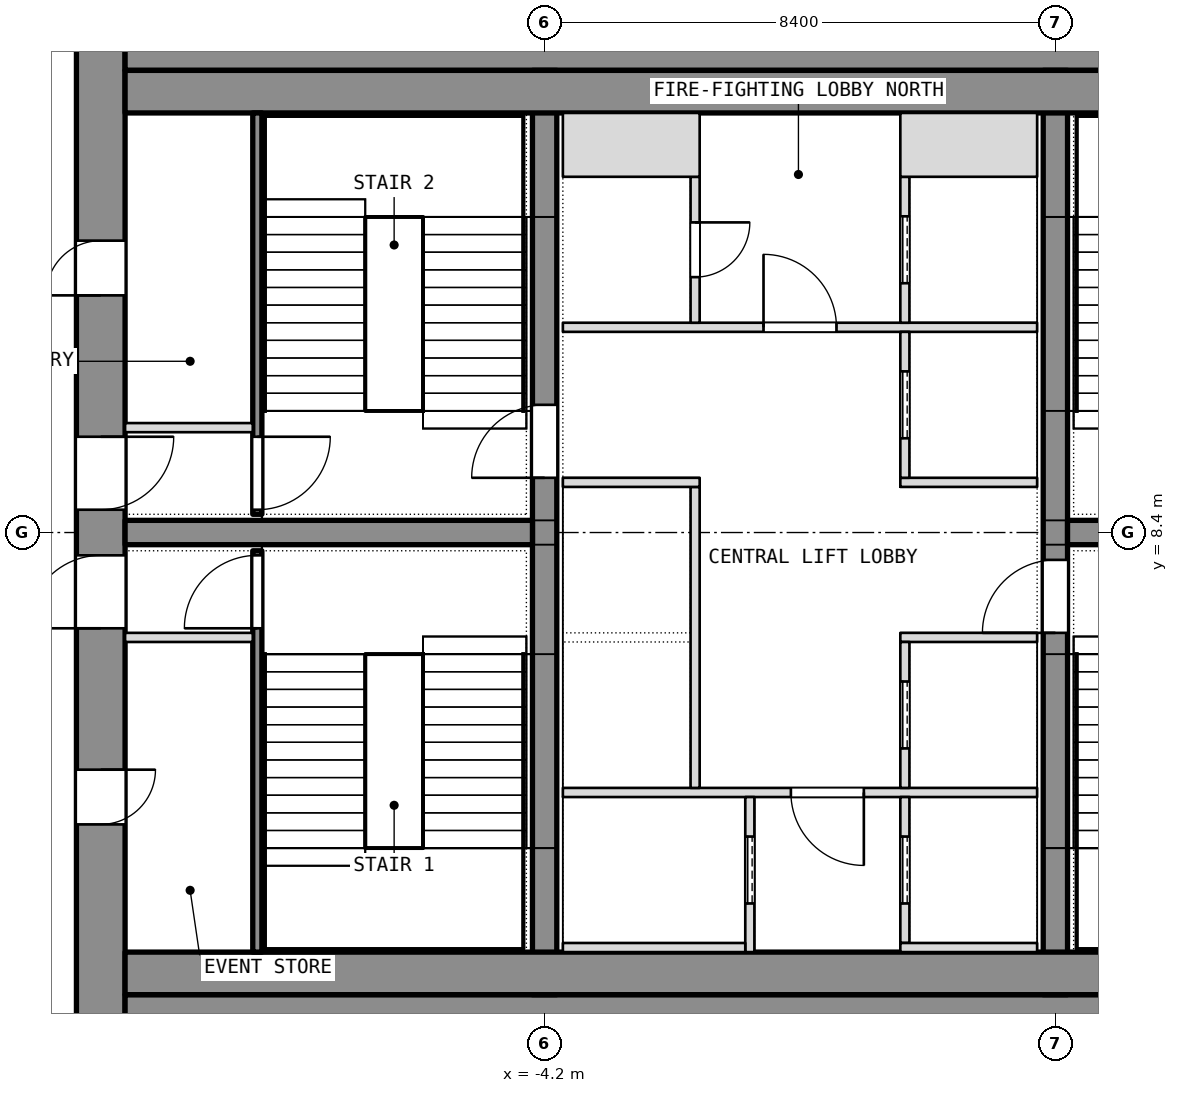
"""IFC4 building model, lengths in metres.
Left out: names, types, materials, properties, quantities, classifications, styles, units other than length and angle.
Written with IfcOpenShell. Run it as: python <this file> out.ifc"""

import sys

from ifc_helpers import new_model, si_unit, direction, frame, frame_2d, origin, place, context, subcontext, project, spatial, rectangle, extrude, element, fill, save


model = new_model("IFC4")
c1 = context("Model", 3, precision=1e-05, world=origin(), true_north=direction((0.0, 1.0)))
c2 = subcontext(c1, "Body", "Model", "MODEL_VIEW")
j1 = project(units=[si_unit("LENGTHUNIT", "METRE"), si_unit("PLANEANGLEUNIT", "RADIAN")], contexts=[c1])
p1 = place(None, origin())
s1 = spatial("IfcSite", under=j1, at=p1, CompositionType="ELEMENT")
p2 = place(p1, origin())
s2 = spatial("IfcBuilding", under=s1, at=p2, CompositionType="ELEMENT")
p3 = place(p2, frame((0.0, 0.0, 180.5)))
s3 = spatial("IfcBuildingStorey", under=s2, at=p3, CompositionType="ELEMENT", Elevation=180.5)
p4 = place(p3, frame((-11.5, 0.0, 0.0), z_axis=(0.0, 0.0, 1.0), x_axis=(0.0, 1.0, 0.0)))
e1 = element("IfcWall", 1, at=p4, inside=s3, PredefinedType="SHEAR", context=c2, shape_type="SweptSolid", body=[
    extrude(rectangle(XDim=16.8, YDim=0.8, at=frame_2d((8.4, 0.0))), origin(), (0.0, 0.0, 1.0), 7.2),
])
p5 = place(p4, frame((3.6, 0.0, 0.0)))
e2 = element("IfcOpeningElement", 2, at=p5, cuts=e1, PredefinedType="OPENING", context=c2, shape_type="SweptSolid", body=[
    extrude(rectangle(XDim=0.9, YDim=2.1, at=frame_2d((0.45, 1.05))), frame((0.0, 0.4, 0.0), z_axis=(0.0, -1.0, 0.0), x_axis=(1.0, 0.0, 0.0)), (0.0, 0.0, 1.0), 0.8),
])
p6 = place(p4, frame((6.825, 0.0, 0.0)))
e3 = element("IfcOpeningElement", 3, at=p6, cuts=e1, PredefinedType="OPENING", context=c2, shape_type="SweptSolid", body=[
    extrude(rectangle(XDim=1.2, YDim=2.1, at=frame_2d((0.6, 1.05))), frame((0.0, 0.4, 0.0), z_axis=(0.0, -1.0, 0.0), x_axis=(1.0, 0.0, 0.0)), (0.0, 0.0, 1.0), 0.8),
])
p7 = place(p4, frame((12.3, 0.0, 0.0)))
e4 = element("IfcOpeningElement", 4, at=p7, cuts=e1, PredefinedType="OPENING", context=c2, shape_type="SweptSolid", body=[
    extrude(rectangle(XDim=0.9, YDim=2.1, at=frame_2d((0.45, 1.05))), frame((0.0, 0.4, 0.0), z_axis=(0.0, -1.0, 0.0), x_axis=(1.0, 0.0, 0.0)), (0.0, 0.0, 1.0), 0.8),
])
p8 = place(p4, frame((8.775, 0.0, 0.0)))
e5 = element("IfcOpeningElement", 5, at=p8, cuts=e1, PredefinedType="OPENING", context=c2, shape_type="SweptSolid", body=[
    extrude(rectangle(XDim=1.2, YDim=2.1, at=frame_2d((0.6, 1.05))), frame((0.0, 0.4, 0.0), z_axis=(0.0, -1.0, 0.0), x_axis=(1.0, 0.0, 0.0)), (0.0, 0.0, 1.0), 0.8),
])
for number, where, z_axis, x_axis in (
    (6, (-11.1, 0.4, 0.0), (0.0, 0.0, 1.0), (1.0, 0.0, 0.0)),
    (7, (-11.1, 16.4, 0.0), (0.0, 0.0, 1.0), (1.0, 0.0, 0.0)),
):
    element("IfcWall", number, at=place(p3, frame(where, z_axis=z_axis, x_axis=x_axis)), inside=s3, PredefinedType="SHEAR", context=c2, shape_type="SweptSolid", body=[
        extrude(rectangle(XDim=22.2, YDim=0.8, at=frame_2d((11.1, 0.0))), origin(), (0.0, 0.0, 1.0), 7.2),
    ])
p9 = place(p3, frame((-4.2, 0.8, 0.0), z_axis=(0.0, 0.0, 1.0), x_axis=(0.0, 1.0, 0.0)))
e8 = element("IfcWall", 8, at=p9, inside=s3, PredefinedType="SHEAR", context=c2, shape_type="SweptSolid", body=[
    extrude(rectangle(XDim=15.2, YDim=0.4, at=frame_2d((7.6, 0.0))), origin(), (0.0, 0.0, 1.0), 7.2),
])
p10 = place(p9, frame((8.5, 0.0, 0.0)))
e9 = element("IfcOpeningElement", 9, at=p10, cuts=e8, PredefinedType="OPENING", context=c2, shape_type="SweptSolid", body=[
    extrude(rectangle(XDim=1.2, YDim=2.1, at=frame_2d((0.6, 1.05))), frame((0.0, 0.2, 0.0), z_axis=(0.0, -1.0, 0.0), x_axis=(1.0, 0.0, 0.0)), (0.0, 0.0, 1.0), 0.4),
])
p11 = place(p3, frame((4.2, 0.8, 0.0), z_axis=(0.0, 0.0, 1.0), x_axis=(0.0, 1.0, 0.0)))
e10 = element("IfcWall", 10, at=p11, inside=s3, PredefinedType="SHEAR", context=c2, shape_type="SweptSolid", body=[
    extrude(rectangle(XDim=15.2, YDim=0.4, at=frame_2d((7.6, 0.0))), origin(), (0.0, 0.0, 1.0), 7.2),
])
p12 = place(p11, frame((5.95, 0.0, 0.0)))
e11 = element("IfcOpeningElement", 11, at=p12, cuts=e10, PredefinedType="OPENING", context=c2, shape_type="SweptSolid", body=[
    extrude(rectangle(XDim=1.2, YDim=2.1, at=frame_2d((0.6, 1.05))), frame((0.0, 0.2, 0.0), z_axis=(0.0, -1.0, 0.0), x_axis=(1.0, 0.0, 0.0)), (0.0, 0.0, 1.0), 0.4),
])
for number, where, z_axis, x_axis in (
    (12, (-11.1, 8.4, 0.0), (0.0, 0.0, 1.0), (1.0, 0.0, 0.0)),
    (13, (4.4, 8.4, 0.0), (0.0, 0.0, 1.0), (1.0, 0.0, 0.0)),
):
    element("IfcWall", number, at=place(p3, frame(where, z_axis=z_axis, x_axis=x_axis)), inside=s3, PredefinedType="SHEAR", context=c2, shape_type="SweptSolid", body=[
        extrude(rectangle(XDim=6.7, YDim=0.4, at=frame_2d((3.35, 0.0))), origin(), (0.0, 0.0, 1.0), 7.2),
    ])
for number, where, z_axis, x_axis in (
    (14, (-11.1, 1.15, 0.0), (0.0, 0.0, 1.0), (1.0, 0.0, 0.0)),
    (15, (-11.1, 15.65, 0.0), (0.0, 0.0, 1.0), (1.0, 0.0, 0.0)),
):
    element("IfcWall", number, at=place(p3, frame(where, z_axis=z_axis, x_axis=x_axis)), inside=s3, PredefinedType="PARTITIONING", context=c2, shape_type="SweptSolid", body=[
        extrude(rectangle(XDim=22.2, YDim=0.7, at=frame_2d((11.1, 0.0))), origin(), (0.0, 0.0, 1.0), 6.94),
    ])
p13 = place(p3, frame((-8.925, 1.5, 0.0), z_axis=(0.0, 0.0, 1.0), x_axis=(0.0, 1.0, 0.0)))
e16 = element("IfcWall", 16, at=p13, inside=s3, PredefinedType="SHEAR", context=c2, shape_type="SweptSolid", body=[
    extrude(rectangle(XDim=6.6, YDim=0.15, at=frame_2d((3.3, 0.0))), origin(), (0.0, 0.0, 1.0), 6.94),
])
p14 = place(p13, frame((5.325, 0.0, 0.0)))
e17 = element("IfcOpeningElement", 17, at=p14, cuts=e16, PredefinedType="OPENING", context=c2, shape_type="SweptSolid", body=[
    extrude(rectangle(XDim=1.2, YDim=2.1, at=frame_2d((0.6, 1.05))), frame((0.0, 0.075, 0.0), z_axis=(0.0, -1.0, 0.0), x_axis=(1.0, 0.0, 0.0)), (0.0, 0.0, 1.0), 0.15),
])
p15 = place(p3, frame((-11.1, 6.675, 0.0), z_axis=(0.0, 0.0, 1.0), x_axis=(1.0, 0.0, 0.0)))
e18 = element("IfcWall", 18, at=p15, inside=s3, PredefinedType="PARTITIONING", context=c2, shape_type="SweptSolid", body=[
    extrude(rectangle(XDim=2.1, YDim=0.15, at=frame_2d((1.05, 0.0))), origin(), (0.0, 0.0, 1.0), 6.94),
])
p16 = place(p3, frame((-8.925, 8.7, 0.0), z_axis=(0.0, 0.0, 1.0), x_axis=(0.0, 1.0, 0.0)))
e19 = element("IfcWall", 19, at=p16, inside=s3, PredefinedType="SHEAR", context=c2, shape_type="SweptSolid", body=[
    extrude(rectangle(XDim=6.6, YDim=0.15, at=frame_2d((3.3, 0.0))), origin(), (0.0, 0.0, 1.0), 6.94),
])
p17 = place(p16, frame((0.075, 0.0, 0.0)))
e20 = element("IfcOpeningElement", 20, at=p17, cuts=e19, PredefinedType="OPENING", context=c2, shape_type="SweptSolid", body=[
    extrude(rectangle(XDim=1.2, YDim=2.1, at=frame_2d((0.6, 1.05))), frame((0.0, 0.075, 0.0), z_axis=(0.0, -1.0, 0.0), x_axis=(1.0, 0.0, 0.0)), (0.0, 0.0, 1.0), 0.15),
])
p18 = place(p3, frame((-11.1, 10.125, 0.0), z_axis=(0.0, 0.0, 1.0), x_axis=(1.0, 0.0, 0.0)))
e21 = element("IfcWall", 21, at=p18, inside=s3, PredefinedType="PARTITIONING", context=c2, shape_type="SweptSolid", body=[
    extrude(rectangle(XDim=2.1, YDim=0.15, at=frame_2d((1.05, 0.0))), origin(), (0.0, 0.0, 1.0), 6.94),
])
p19 = place(p3, frame((-3.9, 4.125, 0.0), z_axis=(0.0, 0.0, 1.0), x_axis=(1.0, 0.0, 0.0)))
e22 = element("IfcWall", 22, at=p19, inside=s3, PredefinedType="PARTITIONING", context=c2, shape_type="SweptSolid", body=[
    extrude(rectangle(XDim=7.8, YDim=0.15, at=frame_2d((3.9, 0.0))), origin(), (0.0, 0.0, 1.0), 6.94),
])
p20 = place(p19, frame((3.75, 0.0, 0.0)))
e23 = element("IfcOpeningElement", 23, at=p20, cuts=e22, PredefinedType="OPENING", context=c2, shape_type="SweptSolid", body=[
    extrude(rectangle(XDim=1.2, YDim=2.1, at=frame_2d((0.6, 1.05))), frame((0.0, 0.075, 0.0), z_axis=(0.0, -1.0, 0.0), x_axis=(1.0, 0.0, 0.0)), (0.0, 0.0, 1.0), 0.15),
])
p21 = place(p3, frame((-3.9, 11.775, 0.0), z_axis=(0.0, 0.0, 1.0), x_axis=(1.0, 0.0, 0.0)))
e24 = element("IfcWall", 24, at=p21, inside=s3, PredefinedType="PARTITIONING", context=c2, shape_type="SweptSolid", body=[
    extrude(rectangle(XDim=7.8, YDim=0.15, at=frame_2d((3.9, 0.0))), origin(), (0.0, 0.0, 1.0), 6.94),
])
p22 = place(p21, frame((3.3, 0.0, 0.0)))
e25 = element("IfcOpeningElement", 25, at=p22, cuts=e24, PredefinedType="OPENING", context=c2, shape_type="SweptSolid", body=[
    extrude(rectangle(XDim=1.2, YDim=2.1, at=frame_2d((0.6, 1.05))), frame((0.0, 0.075, 0.0), z_axis=(0.0, -1.0, 0.0), x_axis=(1.0, 0.0, 0.0)), (0.0, 0.0, 1.0), 0.15),
])
p23 = place(p3, frame((-0.825, 1.5, 0.0), z_axis=(0.0, 0.0, 1.0), x_axis=(0.0, 1.0, 0.0)))
e26 = element("IfcWall", 26, at=p23, inside=s3, PredefinedType="SHEAR", context=c2, shape_type="SweptSolid", body=[
    extrude(rectangle(XDim=2.55, YDim=0.15, at=frame_2d((1.275, 0.0))), origin(), (0.0, 0.0, 1.0), 7.2),
])
p24 = place(p23, frame((0.8, 0.0, 0.0)))
e27 = element("IfcOpeningElement", 27, at=p24, cuts=e26, PredefinedType="OPENING", context=c2, shape_type="SweptSolid", body=[
    extrude(rectangle(XDim=1.1, YDim=2.1, at=frame_2d((0.55, 1.05))), frame((0.0, 0.075, 0.0), z_axis=(0.0, -1.0, 0.0), x_axis=(1.0, 0.0, 0.0)), (0.0, 0.0, 1.0), 0.15),
])
p25 = place(p3, frame((-3.9, 1.575, 0.0), z_axis=(0.0, 0.0, 1.0), x_axis=(1.0, 0.0, 0.0)))
e28 = element("IfcWall", 28, at=p25, inside=s3, PredefinedType="SHEAR", context=c2, shape_type="SweptSolid", body=[
    extrude(rectangle(XDim=3.0, YDim=0.15, at=frame_2d((1.5, 0.0))), origin(), (0.0, 0.0, 1.0), 7.2),
])
p26 = place(p3, frame((-1.725, 4.2, 0.0), z_axis=(0.0, 0.0, 1.0), x_axis=(0.0, 1.0, 0.0)))
e29 = element("IfcWall", 29, at=p26, inside=s3, PredefinedType="SHEAR", context=c2, shape_type="SweptSolid", body=[
    extrude(rectangle(XDim=4.95, YDim=0.15, at=frame_2d((2.475, 0.0))), origin(), (0.0, 0.0, 1.0), 7.2),
])
p27 = place(p3, frame((-3.9, 9.225, 0.0), z_axis=(0.0, 0.0, 1.0), x_axis=(1.0, 0.0, 0.0)))
e30 = element("IfcWall", 30, at=p27, inside=s3, PredefinedType="SHEAR", context=c2, shape_type="SweptSolid", body=[
    extrude(rectangle(XDim=2.25, YDim=0.15, at=frame_2d((1.125, 0.0))), origin(), (0.0, 0.0, 1.0), 7.2),
])
p28 = place(p3, frame((-1.725, 11.85, 0.0), z_axis=(0.0, 0.0, 1.0), x_axis=(0.0, 1.0, 0.0)))
e31 = element("IfcWall", 31, at=p28, inside=s3, PredefinedType="PARTITIONING", context=c2, shape_type="SweptSolid", body=[
    extrude(rectangle(XDim=2.4, YDim=0.15, at=frame_2d((1.2, 0.0))), origin(), (0.0, 0.0, 1.0), 6.94),
])
p29 = place(p28, frame((0.75, 0.0, 0.0)))
e32 = element("IfcOpeningElement", 32, at=p29, cuts=e31, PredefinedType="OPENING", context=c2, shape_type="SweptSolid", body=[
    extrude(rectangle(XDim=0.9, YDim=2.1, at=frame_2d((0.45, 1.05))), frame((0.0, 0.075, 0.0), z_axis=(0.0, -1.0, 0.0), x_axis=(1.0, 0.0, 0.0)), (0.0, 0.0, 1.0), 0.15),
])
p30 = place(p3, frame((-3.9, 14.775, 0.0), z_axis=(0.0, 0.0, 1.0), x_axis=(1.0, 0.0, 0.0)))
e33 = element("IfcWall", 33, at=p30, inside=s3, PredefinedType="PARTITIONING", context=c2, shape_type="SweptSolid", body=[
    extrude(rectangle(XDim=2.25, YDim=1.05, at=frame_2d((1.125, 0.0))), origin(), (0.0, 0.0, 1.0), 6.94),
])
p31 = place(p3, frame((1.725, 1.65, 0.0), z_axis=(0.0, 0.0, 1.0), x_axis=(0.0, 1.0, 0.0)))
e34 = element("IfcWall", 34, at=p31, inside=s3, PredefinedType="SHEAR", context=c2, shape_type="SweptSolid", body=[
    extrude(rectangle(XDim=2.4, YDim=0.15, at=frame_2d((1.2, 0.0))), origin(), (0.0, 0.0, 1.0), 7.2),
])
p32 = place(p31, frame((0.65, 0.0, 0.0)))
e35 = element("IfcOpeningElement", 35, at=p32, cuts=e34, PredefinedType="OPENING", context=c2, shape_type="SweptSolid", body=[
    extrude(rectangle(XDim=1.1, YDim=2.1, at=frame_2d((0.55, 1.05))), frame((0.0, 0.075, 0.0), z_axis=(0.0, -1.0, 0.0), x_axis=(1.0, 0.0, 0.0)), (0.0, 0.0, 1.0), 0.15),
])
p33 = place(p3, frame((1.65, 1.575, 0.0), z_axis=(0.0, 0.0, 1.0), x_axis=(1.0, 0.0, 0.0)))
e36 = element("IfcWall", 36, at=p33, inside=s3, PredefinedType="SHEAR", context=c2, shape_type="SweptSolid", body=[
    extrude(rectangle(XDim=2.25, YDim=0.15, at=frame_2d((1.125, 0.0))), origin(), (0.0, 0.0, 1.0), 7.2),
])
p34 = place(p3, frame((1.725, 11.85, 0.0), z_axis=(0.0, 0.0, 1.0), x_axis=(0.0, 1.0, 0.0)))
e37 = element("IfcWall", 37, at=p34, inside=s3, PredefinedType="SHEAR", context=c2, shape_type="SweptSolid", body=[
    extrude(rectangle(XDim=2.4, YDim=0.15, at=frame_2d((1.2, 0.0))), origin(), (0.0, 0.0, 1.0), 7.2),
])
p35 = place(p34, frame((0.65, 0.0, 0.0)))
e38 = element("IfcOpeningElement", 38, at=p35, cuts=e37, PredefinedType="OPENING", context=c2, shape_type="SweptSolid", body=[
    extrude(rectangle(XDim=1.1, YDim=2.1, at=frame_2d((0.55, 1.05))), frame((0.0, 0.075, 0.0), z_axis=(0.0, -1.0, 0.0), x_axis=(1.0, 0.0, 0.0)), (0.0, 0.0, 1.0), 0.15),
])
p36 = place(p3, frame((1.65, 14.775, 0.0), z_axis=(0.0, 0.0, 1.0), x_axis=(1.0, 0.0, 0.0)))
e39 = element("IfcWall", 39, at=p36, inside=s3, PredefinedType="SHEAR", context=c2, shape_type="SweptSolid", body=[
    extrude(rectangle(XDim=2.25, YDim=1.05, at=frame_2d((1.125, 0.0))), origin(), (0.0, 0.0, 1.0), 7.2),
])
for number, where, z_axis, x_axis in (
    (40, (1.65, 6.675, 0.0), (0.0, 0.0, 1.0), (1.0, 0.0, 0.0)),
    (41, (1.65, 9.225, 0.0), (0.0, 0.0, 1.0), (1.0, 0.0, 0.0)),
):
    element("IfcWall", number, at=place(p3, frame(where, z_axis=z_axis, x_axis=x_axis)), inside=s3, PredefinedType="SHEAR", context=c2, shape_type="SweptSolid", body=[
        extrude(rectangle(XDim=2.25, YDim=0.15, at=frame_2d((1.125, 0.0))), origin(), (0.0, 0.0, 1.0), 6.94),
    ])
p37 = place(p3, frame((1.725, 4.2, 0.0), z_axis=(0.0, 0.0, 1.0), x_axis=(0.0, 1.0, 0.0)))
e42 = element("IfcWall", 42, at=p37, inside=s3, PredefinedType="SHEAR", context=c2, shape_type="SweptSolid", body=[
    extrude(rectangle(XDim=2.4, YDim=0.15, at=frame_2d((1.2, 0.0))), origin(), (0.0, 0.0, 1.0), 6.94),
])
p38 = place(p37, frame((0.65, 0.0, 0.0)))
e43 = element("IfcOpeningElement", 43, at=p38, cuts=e42, PredefinedType="OPENING", context=c2, shape_type="SweptSolid", body=[
    extrude(rectangle(XDim=1.1, YDim=2.1, at=frame_2d((0.55, 1.05))), frame((0.0, 0.075, 0.0), z_axis=(0.0, -1.0, 0.0), x_axis=(1.0, 0.0, 0.0)), (0.0, 0.0, 1.0), 0.15),
])
p39 = place(p3, frame((1.725, 9.3, 0.0), z_axis=(0.0, 0.0, 1.0), x_axis=(0.0, 1.0, 0.0)))
e44 = element("IfcWall", 44, at=p39, inside=s3, PredefinedType="SHEAR", context=c2, shape_type="SweptSolid", body=[
    extrude(rectangle(XDim=2.4, YDim=0.15, at=frame_2d((1.2, 0.0))), origin(), (0.0, 0.0, 1.0), 6.94),
])
p40 = place(p39, frame((0.65, 0.0, 0.0)))
e45 = element("IfcOpeningElement", 45, at=p40, cuts=e44, PredefinedType="OPENING", context=c2, shape_type="SweptSolid", body=[
    extrude(rectangle(XDim=1.1, YDim=2.1, at=frame_2d((0.55, 1.05))), frame((0.0, 0.075, 0.0), z_axis=(0.0, -1.0, 0.0), x_axis=(1.0, 0.0, 0.0)), (0.0, 0.0, 1.0), 0.15),
])
p41 = place(p5, origin())
e46 = element("IfcDoor", 46, at=p41, inside=s3, OperationType="SINGLE_SWING_LEFT", PredefinedType="DOOR", context=c2, shape_type="SweptSolid", body=[
    extrude(rectangle(XDim=0.9, YDim=2.1, at=frame_2d((0.45, 1.05))), frame((0.0, 0.025, 0.0), z_axis=(0.0, -1.0, 0.0), x_axis=(1.0, 0.0, 0.0)), (0.0, 0.0, 1.0), 0.05),
])
fill(e2, e46)
p42 = place(p6, origin())
e47 = element("IfcDoor", 47, at=p42, inside=s3, OperationType="SINGLE_SWING_LEFT", PredefinedType="DOOR", context=c2, shape_type="SweptSolid", body=[
    extrude(rectangle(XDim=1.2, YDim=2.1, at=frame_2d((0.6, 1.05))), frame((0.0, 0.025, 0.0), z_axis=(0.0, -1.0, 0.0), x_axis=(1.0, 0.0, 0.0)), (0.0, 0.0, 1.0), 0.05),
])
fill(e3, e47)
p43 = place(p14, origin())
e48 = element("IfcDoor", 48, at=p43, inside=s3, OperationType="SINGLE_SWING_LEFT", PredefinedType="DOOR", context=c2, shape_type="SweptSolid", body=[
    extrude(rectangle(XDim=1.2, YDim=2.1, at=frame_2d((0.6, 1.05))), frame((0.0, 0.025, 0.0), z_axis=(0.0, -1.0, 0.0), x_axis=(1.0, 0.0, 0.0)), (0.0, 0.0, 1.0), 0.05),
])
fill(e17, e48)
p44 = place(p7, origin())
e49 = element("IfcDoor", 49, at=p44, inside=s3, OperationType="SINGLE_SWING_LEFT", PredefinedType="DOOR", context=c2, shape_type="SweptSolid", body=[
    extrude(rectangle(XDim=0.9, YDim=2.1, at=frame_2d((0.45, 1.05))), frame((0.0, 0.025, 0.0), z_axis=(0.0, -1.0, 0.0), x_axis=(1.0, 0.0, 0.0)), (0.0, 0.0, 1.0), 0.05),
])
fill(e4, e49)
p45 = place(p8, origin())
e50 = element("IfcDoor", 50, at=p45, inside=s3, OperationType="SINGLE_SWING_LEFT", PredefinedType="DOOR", context=c2, shape_type="SweptSolid", body=[
    extrude(rectangle(XDim=1.2, YDim=2.1, at=frame_2d((0.6, 1.05))), frame((0.0, 0.025, 0.0), z_axis=(0.0, -1.0, 0.0), x_axis=(1.0, 0.0, 0.0)), (0.0, 0.0, 1.0), 0.05),
])
fill(e5, e50)
p46 = place(p17, origin())
e51 = element("IfcDoor", 51, at=p46, inside=s3, OperationType="SINGLE_SWING_LEFT", PredefinedType="DOOR", context=c2, shape_type="SweptSolid", body=[
    extrude(rectangle(XDim=1.2, YDim=2.1, at=frame_2d((0.6, 1.05))), frame((0.0, 0.025, 0.0), z_axis=(0.0, -1.0, 0.0), x_axis=(1.0, 0.0, 0.0)), (0.0, 0.0, 1.0), 0.05),
])
fill(e20, e51)
p47 = place(p24, origin())
e52 = element("IfcDoor", 52, at=p47, inside=s3, OperationType="SLIDING_TO_LEFT", PredefinedType="DOOR", context=c2, shape_type="SweptSolid", body=[
    extrude(rectangle(XDim=1.1, YDim=2.1, at=frame_2d((0.55, 1.05))), frame((0.0, 0.025, 0.0), z_axis=(0.0, -1.0, 0.0), x_axis=(1.0, 0.0, 0.0)), (0.0, 0.0, 1.0), 0.05),
])
fill(e27, e52)
p48 = place(p32, origin())
e53 = element("IfcDoor", 53, at=p48, inside=s3, OperationType="SLIDING_TO_LEFT", PredefinedType="DOOR", context=c2, shape_type="SweptSolid", body=[
    extrude(rectangle(XDim=1.1, YDim=2.1, at=frame_2d((0.55, 1.05))), frame((0.0, 0.025, 0.0), z_axis=(0.0, -1.0, 0.0), x_axis=(1.0, 0.0, 0.0)), (0.0, 0.0, 1.0), 0.05),
])
fill(e35, e53)
p49 = place(p38, origin())
e54 = element("IfcDoor", 54, at=p49, inside=s3, OperationType="SLIDING_TO_LEFT", PredefinedType="DOOR", context=c2, shape_type="SweptSolid", body=[
    extrude(rectangle(XDim=1.1, YDim=2.1, at=frame_2d((0.55, 1.05))), frame((0.0, 0.025, 0.0), z_axis=(0.0, -1.0, 0.0), x_axis=(1.0, 0.0, 0.0)), (0.0, 0.0, 1.0), 0.05),
])
fill(e43, e54)
p50 = place(p40, origin())
e55 = element("IfcDoor", 55, at=p50, inside=s3, OperationType="SLIDING_TO_LEFT", PredefinedType="DOOR", context=c2, shape_type="SweptSolid", body=[
    extrude(rectangle(XDim=1.1, YDim=2.1, at=frame_2d((0.55, 1.05))), frame((0.0, 0.025, 0.0), z_axis=(0.0, -1.0, 0.0), x_axis=(1.0, 0.0, 0.0)), (0.0, 0.0, 1.0), 0.05),
])
fill(e45, e55)
p51 = place(p35, origin())
e56 = element("IfcDoor", 56, at=p51, inside=s3, OperationType="SLIDING_TO_LEFT", PredefinedType="DOOR", context=c2, shape_type="SweptSolid", body=[
    extrude(rectangle(XDim=1.1, YDim=2.1, at=frame_2d((0.55, 1.05))), frame((0.0, 0.025, 0.0), z_axis=(0.0, -1.0, 0.0), x_axis=(1.0, 0.0, 0.0)), (0.0, 0.0, 1.0), 0.05),
])
fill(e38, e56)
p52 = place(p20, origin())
e57 = element("IfcDoor", 57, at=p52, inside=s3, OperationType="SINGLE_SWING_LEFT", PredefinedType="DOOR", context=c2, shape_type="SweptSolid", body=[
    extrude(rectangle(XDim=1.2, YDim=2.1, at=frame_2d((0.6, 1.05))), frame((0.0, 0.025, 0.0), z_axis=(0.0, -1.0, 0.0), x_axis=(1.0, 0.0, 0.0)), (0.0, 0.0, 1.0), 0.05),
])
fill(e23, e57)
p53 = place(p22, origin())
e58 = element("IfcDoor", 58, at=p53, inside=s3, OperationType="SINGLE_SWING_LEFT", PredefinedType="DOOR", context=c2, shape_type="SweptSolid", body=[
    extrude(rectangle(XDim=1.2, YDim=2.1, at=frame_2d((0.6, 1.05))), frame((0.0, 0.025, 0.0), z_axis=(0.0, -1.0, 0.0), x_axis=(1.0, 0.0, 0.0)), (0.0, 0.0, 1.0), 0.05),
])
fill(e25, e58)
p54 = place(p29, origin())
e59 = element("IfcDoor", 59, at=p54, inside=s3, OperationType="SINGLE_SWING_LEFT", PredefinedType="DOOR", context=c2, shape_type="SweptSolid", body=[
    extrude(rectangle(XDim=0.9, YDim=2.1, at=frame_2d((0.45, 1.05))), frame((0.0, 0.025, 0.0), z_axis=(0.0, -1.0, 0.0), x_axis=(1.0, 0.0, 0.0)), (0.0, 0.0, 1.0), 0.05),
])
fill(e32, e59)
p55 = place(p10, origin())
e60 = element("IfcDoor", 60, at=p55, inside=s3, OperationType="SINGLE_SWING_LEFT", PredefinedType="DOOR", context=c2, shape_type="SweptSolid", body=[
    extrude(rectangle(XDim=1.2, YDim=2.1, at=frame_2d((0.6, 1.05))), frame((0.0, 0.025, 0.0), z_axis=(0.0, -1.0, 0.0), x_axis=(1.0, 0.0, 0.0)), (0.0, 0.0, 1.0), 0.05),
])
fill(e9, e60)
p56 = place(p12, origin())
e61 = element("IfcDoor", 61, at=p56, inside=s3, OperationType="SINGLE_SWING_LEFT", PredefinedType="DOOR", context=c2, shape_type="SweptSolid", body=[
    extrude(rectangle(XDim=1.2, YDim=2.1, at=frame_2d((0.6, 1.05))), frame((0.0, 0.025, 0.0), z_axis=(0.0, -1.0, 0.0), x_axis=(1.0, 0.0, 0.0)), (0.0, 0.0, 1.0), 0.05),
])
fill(e11, e61)
save(model, sys.argv[1])
